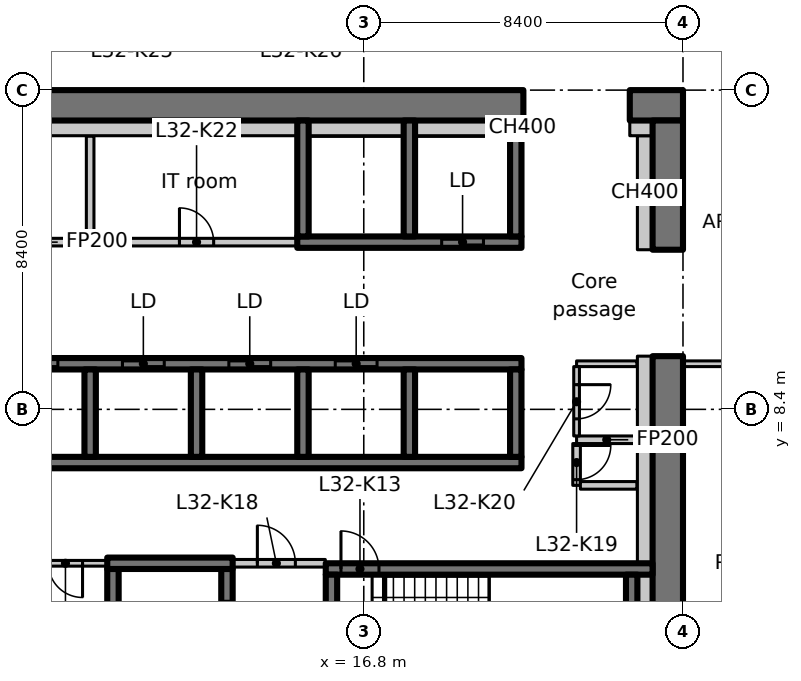
"""IFC4 building model, lengths in metres.
Left out: names, types, materials, properties, quantities, classifications, styles, units other than length and angle.
Written with IfcOpenShell. Run it as: python <this file> out.ifc"""

import sys

from ifc_helpers import new_model, si_unit, direction, frame, frame_2d, origin, place, context, subcontext, project, spatial, rectangle, extrude, element, fill, save


model = new_model("IFC4")
c1 = context("Model", 3, precision=1e-05, world=origin(), true_north=direction((0.0, 1.0)))
c2 = subcontext(c1, "Body", "Model", "MODEL_VIEW")
j1 = project(units=[si_unit("LENGTHUNIT", "METRE"), si_unit("PLANEANGLEUNIT", "RADIAN")], contexts=[c1])
p1 = place(None, origin())
s1 = spatial("IfcSite", under=j1, at=p1, CompositionType="ELEMENT")
p2 = place(p1, origin())
s2 = spatial("IfcBuilding", under=s1, at=p2, CompositionType="ELEMENT")
p3 = place(p2, frame((0.0, 0.0, 131.3)))
s3 = spatial("IfcBuildingStorey", under=s2, at=p3, CompositionType="ELEMENT", Elevation=131.3)
p4 = place(p3, frame((-1.1, 16.4, 0.0), z_axis=(0.0, 0.0, 1.0), x_axis=(1.0, 0.0, 0.0)))
e1 = element("IfcWall", 1, at=p4, inside=s3, PredefinedType="SHEAR", context=c2, shape_type="SweptSolid", body=[
    extrude(rectangle(XDim=22.1, YDim=0.8, at=frame_2d((11.05, 0.0))), origin(), (0.0, 0.0, 1.0), 3.35),
])
p5 = place(p4, frame((3.15, 0.0, 0.0)))
e2 = element("IfcOpeningElement", 2, at=p5, cuts=e1, PredefinedType="OPENING", context=c2, shape_type="SweptSolid", body=[
    extrude(rectangle(XDim=1.1, YDim=2.3, at=frame_2d((0.55, 1.15))), frame((0.0, 0.41, 0.0), z_axis=(0.0, -1.0, 0.0), x_axis=(1.0, 0.0, 0.0)), (0.0, 0.0, 1.0), 0.82),
])
p6 = place(p3, frame((23.8, 16.4, 0.0), z_axis=(0.0, 0.0, 1.0), x_axis=(1.0, 0.0, 0.0)))
e3 = element("IfcWall", 3, at=p6, inside=s3, PredefinedType="SHEAR", context=c2, shape_type="SweptSolid", body=[
    extrude(rectangle(XDim=1.4, YDim=0.8, at=frame_2d((0.7, 0.0))), origin(), (0.0, 0.0, 1.0), 3.35),
])
p7 = place(p3, frame((24.8, 0.8, 0.0), z_axis=(0.0, 0.0, 1.0), x_axis=(0.0, 1.0, 0.0)))
e4 = element("IfcWall", 4, at=p7, inside=s3, PredefinedType="SHEAR", context=c2, shape_type="SweptSolid", body=[
    extrude(rectangle(XDim=9.0, YDim=0.8, at=frame_2d((4.5, 0.0))), origin(), (0.0, 0.0, 1.0), 3.35),
])
p8 = place(p3, frame((24.8, 12.6, 0.0), z_axis=(0.0, 0.0, 1.0), x_axis=(0.0, 1.0, 0.0)))
e5 = element("IfcWall", 5, at=p8, inside=s3, PredefinedType="SHEAR", context=c2, shape_type="SweptSolid", body=[
    extrude(rectangle(XDim=3.4, YDim=0.8, at=frame_2d((1.7, 0.0))), origin(), (0.0, 0.0, 1.0), 3.35),
])
p9 = place(p3, frame((24.2, 12.6, 0.0), z_axis=(0.0, 0.0, 1.0), x_axis=(0.0, 1.0, 0.0)))
e6 = element("IfcWall", 6, at=p9, inside=s3, PredefinedType="PARTITIONING", context=c2, shape_type="SweptSolid", body=[
    extrude(rectangle(XDim=3.0, YDim=0.4, at=frame_2d((1.5, 0.0))), origin(), (0.0, 0.0, 1.0), 3.35),
])
p10 = place(p3, frame((23.8, 15.8, 0.0), z_axis=(0.0, 0.0, 1.0), x_axis=(1.0, 0.0, 0.0)))
e7 = element("IfcWall", 7, at=p10, inside=s3, PredefinedType="PARTITIONING", context=c2, shape_type="SweptSolid", body=[
    extrude(rectangle(XDim=0.6, YDim=0.4, at=frame_2d((0.3, 0.0))), origin(), (0.0, 0.0, 1.0), 3.35),
])
p11 = place(p3, frame((0.8, 7.0, 0.0), z_axis=(0.0, 0.0, 1.0), x_axis=(1.0, 0.0, 0.0)))
e8 = element("IfcWall", 8, at=p11, inside=s3, PredefinedType="SHEAR", context=c2, shape_type="SweptSolid", body=[
    extrude(rectangle(XDim=20.15, YDim=0.3, at=frame_2d((10.075, 0.0))), origin(), (0.0, 0.0, 1.0), 3.35),
])
p12 = place(p3, frame((0.8, 9.6, 0.0), z_axis=(0.0, 0.0, 1.0), x_axis=(1.0, 0.0, 0.0)))
e9 = element("IfcWall", 9, at=p12, inside=s3, PredefinedType="SHEAR", context=c2, shape_type="SweptSolid", body=[
    extrude(rectangle(XDim=20.15, YDim=0.3, at=frame_2d((10.075, 0.0))), origin(), (0.0, 0.0, 1.0), 3.35),
])
p13 = place(p12, frame((1.25, 0.0, 0.0)))
e10 = element("IfcOpeningElement", 10, at=p13, cuts=e9, PredefinedType="OPENING", context=c2, shape_type="SweptSolid", body=[
    extrude(rectangle(XDim=1.1, YDim=2.3, at=frame_2d((0.55, 1.15))), frame((0.0, 0.16, 0.0), z_axis=(0.0, -1.0, 0.0), x_axis=(1.0, 0.0, 0.0)), (0.0, 0.0, 1.0), 0.32),
])
p14 = place(p12, frame((4.05, 0.0, 0.0)))
e11 = element("IfcOpeningElement", 11, at=p14, cuts=e9, PredefinedType="OPENING", context=c2, shape_type="SweptSolid", body=[
    extrude(rectangle(XDim=1.1, YDim=2.3, at=frame_2d((0.55, 1.15))), frame((0.0, 0.16, 0.0), z_axis=(0.0, -1.0, 0.0), x_axis=(1.0, 0.0, 0.0)), (0.0, 0.0, 1.0), 0.32),
])
p15 = place(p12, frame((6.85, 0.0, 0.0)))
e12 = element("IfcOpeningElement", 12, at=p15, cuts=e9, PredefinedType="OPENING", context=c2, shape_type="SweptSolid", body=[
    extrude(rectangle(XDim=1.1, YDim=2.3, at=frame_2d((0.55, 1.15))), frame((0.0, 0.16, 0.0), z_axis=(0.0, -1.0, 0.0), x_axis=(1.0, 0.0, 0.0)), (0.0, 0.0, 1.0), 0.32),
])
p16 = place(p12, frame((9.65, 0.0, 0.0)))
e13 = element("IfcOpeningElement", 13, at=p16, cuts=e9, PredefinedType="OPENING", context=c2, shape_type="SweptSolid", body=[
    extrude(rectangle(XDim=1.1, YDim=2.3, at=frame_2d((0.55, 1.15))), frame((0.0, 0.16, 0.0), z_axis=(0.0, -1.0, 0.0), x_axis=(1.0, 0.0, 0.0)), (0.0, 0.0, 1.0), 0.32),
])
p17 = place(p12, frame((12.45, 0.0, 0.0)))
e14 = element("IfcOpeningElement", 14, at=p17, cuts=e9, PredefinedType="OPENING", context=c2, shape_type="SweptSolid", body=[
    extrude(rectangle(XDim=1.1, YDim=2.3, at=frame_2d((0.55, 1.15))), frame((0.0, 0.16, 0.0), z_axis=(0.0, -1.0, 0.0), x_axis=(1.0, 0.0, 0.0)), (0.0, 0.0, 1.0), 0.32),
])
p18 = place(p12, frame((15.25, 0.0, 0.0)))
e15 = element("IfcOpeningElement", 15, at=p18, cuts=e9, PredefinedType="OPENING", context=c2, shape_type="SweptSolid", body=[
    extrude(rectangle(XDim=1.1, YDim=2.3, at=frame_2d((0.55, 1.15))), frame((0.0, 0.16, 0.0), z_axis=(0.0, -1.0, 0.0), x_axis=(1.0, 0.0, 0.0)), (0.0, 0.0, 1.0), 0.32),
])
for number, where, z_axis, x_axis in (
    (16, (9.6, 7.15, 0.0), (0.0, 0.0, 1.0), (0.0, 1.0, 0.0)),
    (17, (12.4, 7.15, 0.0), (0.0, 0.0, 1.0), (0.0, 1.0, 0.0)),
    (18, (15.2, 7.15, 0.0), (0.0, 0.0, 1.0), (0.0, 1.0, 0.0)),
    (19, (18.0, 7.15, 0.0), (0.0, 0.0, 1.0), (0.0, 1.0, 0.0)),
    (20, (20.8, 7.15, 0.0), (0.0, 0.0, 1.0), (0.0, 1.0, 0.0)),
):
    element("IfcWall", number, at=place(p3, frame(where, z_axis=z_axis, x_axis=x_axis)), inside=s3, PredefinedType="SHEAR", context=c2, shape_type="SweptSolid", body=[
        extrude(rectangle(XDim=2.3, YDim=0.3, at=frame_2d((1.15, 0.0))), origin(), (0.0, 0.0, 1.0), 3.35),
    ])
p19 = place(p3, frame((15.05, 12.8, 0.0), z_axis=(0.0, 0.0, 1.0), x_axis=(1.0, 0.0, 0.0)))
e21 = element("IfcWall", 21, at=p19, inside=s3, PredefinedType="SHEAR", context=c2, shape_type="SweptSolid", body=[
    extrude(rectangle(XDim=5.9, YDim=0.3, at=frame_2d((2.95, 0.0))), origin(), (0.0, 0.0, 1.0), 3.35),
])
p20 = place(p19, frame((3.8, 0.0, 0.0)))
e22 = element("IfcOpeningElement", 22, at=p20, cuts=e21, PredefinedType="OPENING", context=c2, shape_type="SweptSolid", body=[
    extrude(rectangle(XDim=1.1, YDim=2.3, at=frame_2d((0.55, 1.15))), frame((0.0, 0.16, 0.0), z_axis=(0.0, -1.0, 0.0), x_axis=(1.0, 0.0, 0.0)), (0.0, 0.0, 1.0), 0.32),
])
for number, where, z_axis, x_axis in (
    (23, (15.2, 12.95, 0.0), (0.0, 0.0, 1.0), (0.0, 1.0, 0.0)),
    (24, (18.0, 12.95, 0.0), (0.0, 0.0, 1.0), (0.0, 1.0, 0.0)),
    (25, (20.8, 12.95, 0.0), (0.0, 0.0, 1.0), (0.0, 1.0, 0.0)),
):
    element("IfcWall", number, at=place(p3, frame(where, z_axis=z_axis, x_axis=x_axis)), inside=s3, PredefinedType="SHEAR", context=c2, shape_type="SweptSolid", body=[
        extrude(rectangle(XDim=3.05, YDim=0.3, at=frame_2d((1.525, 0.0))), origin(), (0.0, 0.0, 1.0), 3.35),
    ])
p21 = place(p3, frame((10.2, 0.8, 0.0), z_axis=(0.0, 0.0, 1.0), x_axis=(0.0, 1.0, 0.0)))
e26 = element("IfcWall", 26, at=p21, inside=s3, PredefinedType="SHEAR", context=c2, shape_type="SweptSolid", body=[
    extrude(rectangle(XDim=3.4, YDim=0.3, at=frame_2d((1.7, 0.0))), origin(), (0.0, 0.0, 1.0), 3.35),
])
p22 = place(p3, frame((13.2, 0.8, 0.0), z_axis=(0.0, 0.0, 1.0), x_axis=(0.0, 1.0, 0.0)))
e27 = element("IfcWall", 27, at=p22, inside=s3, PredefinedType="SHEAR", context=c2, shape_type="SweptSolid", body=[
    extrude(rectangle(XDim=3.4, YDim=0.3, at=frame_2d((1.7, 0.0))), origin(), (0.0, 0.0, 1.0), 3.35),
])
p23 = place(p22, frame((1.45, 0.0, 0.0)))
e28 = element("IfcOpeningElement", 28, at=p23, cuts=e27, PredefinedType="OPENING", context=c2, shape_type="SweptSolid", body=[
    extrude(rectangle(XDim=1.1, YDim=2.3, at=frame_2d((0.55, 1.15))), frame((0.0, 0.16, 0.0), z_axis=(0.0, -1.0, 0.0), x_axis=(1.0, 0.0, 0.0)), (0.0, 0.0, 1.0), 0.32),
])
p24 = place(p3, frame((10.05, 4.35, 0.0), z_axis=(0.0, 0.0, 1.0), x_axis=(1.0, 0.0, 0.0)))
e29 = element("IfcWall", 29, at=p24, inside=s3, PredefinedType="SHEAR", context=c2, shape_type="SweptSolid", body=[
    extrude(rectangle(XDim=3.3, YDim=0.3, at=frame_2d((1.65, 0.0))), origin(), (0.0, 0.0, 1.0), 3.35),
])
p25 = place(p3, frame((15.8, 4.2, 0.0), z_axis=(0.0, 0.0, 1.0), x_axis=(1.0, 0.0, 0.0)))
e30 = element("IfcWall", 30, at=p25, inside=s3, PredefinedType="SHEAR", context=c2, shape_type="SweptSolid", body=[
    extrude(rectangle(XDim=8.6, YDim=0.3, at=frame_2d((4.3, 0.0))), origin(), (0.0, 0.0, 1.0), 3.35),
])
p26 = place(p25, frame((0.4, 0.0, 0.0)))
e31 = element("IfcOpeningElement", 31, at=p26, cuts=e30, PredefinedType="OPENING", context=c2, shape_type="SweptSolid", body=[
    extrude(rectangle(XDim=1.0, YDim=2.1, at=frame_2d((0.5, 1.05))), frame((0.0, 0.16, 0.0), z_axis=(0.0, -1.0, 0.0), x_axis=(1.0, 0.0, 0.0)), (0.0, 0.0, 1.0), 0.32),
])
p27 = place(p3, frame((15.95, 1.5, 0.0), z_axis=(0.0, 0.0, 1.0), x_axis=(0.0, 1.0, 0.0)))
e32 = element("IfcWall", 32, at=p27, inside=s3, PredefinedType="SHEAR", context=c2, shape_type="SweptSolid", body=[
    extrude(rectangle(XDim=2.55, YDim=0.3, at=frame_2d((1.275, 0.0))), origin(), (0.0, 0.0, 1.0), 3.35),
])
p28 = place(p27, frame((0.8, 0.0, 0.0)))
e33 = element("IfcOpeningElement", 33, at=p28, cuts=e32, PredefinedType="OPENING", context=c2, shape_type="SweptSolid", body=[
    extrude(rectangle(XDim=1.0, YDim=2.1, at=frame_2d((0.5, 1.05))), frame((0.0, 0.16, 0.0), z_axis=(0.0, -1.0, 0.0), x_axis=(1.0, 0.0, 0.0)), (0.0, 0.0, 1.0), 0.32),
])
p29 = place(p3, frame((23.85, 1.5, 0.0), z_axis=(0.0, 0.0, 1.0), x_axis=(0.0, 1.0, 0.0)))
e34 = element("IfcWall", 34, at=p29, inside=s3, PredefinedType="SHEAR", context=c2, shape_type="SweptSolid", body=[
    extrude(rectangle(XDim=2.55, YDim=0.3, at=frame_2d((1.275, 0.0))), origin(), (0.0, 0.0, 1.0), 3.35),
])
p30 = place(p3, frame((13.362, 4.35, 0.0), z_axis=(0.0, 0.0, 1.0), x_axis=(1.0, 0.0, 0.0)))
e35 = element("IfcWall", 35, at=p30, inside=s3, PredefinedType="PARTITIONING", context=c2, shape_type="SweptSolid", body=[
    extrude(rectangle(XDim=2.426, YDim=0.2, at=frame_2d((1.213, 0.0))), origin(), (0.0, 0.0, 1.0), 3.35),
])
p31 = place(p30, frame((0.638, 0.0, 0.0)))
e36 = element("IfcOpeningElement", 36, at=p31, cuts=e35, PredefinedType="OPENING", context=c2, shape_type="SweptSolid", body=[
    extrude(rectangle(XDim=1.0, YDim=2.1, at=frame_2d((0.5, 1.05))), frame((0.0, 0.11, 0.0), z_axis=(0.0, -1.0, 0.0), x_axis=(1.0, 0.0, 0.0)), (0.0, 0.0, 1.0), 0.22),
])
p32 = place(p3, frame((4.162, 12.8, 0.0), z_axis=(0.0, 0.0, 1.0), x_axis=(1.0, 0.0, 0.0)))
e37 = element("IfcWall", 37, at=p32, inside=s3, PredefinedType="PARTITIONING", context=c2, shape_type="SweptSolid", body=[
    extrude(rectangle(XDim=5.438, YDim=0.2, at=frame_2d((2.719, 0.0))), origin(), (0.0, 0.0, 1.0), 3.35),
])
p33 = place(p32, frame((2.188, 0.0, 0.0)))
e38 = element("IfcOpeningElement", 38, at=p33, cuts=e37, PredefinedType="OPENING", context=c2, shape_type="SweptSolid", body=[
    extrude(rectangle(XDim=0.9, YDim=2.1, at=frame_2d((0.45, 1.05))), frame((0.0, 0.11, 0.0), z_axis=(0.0, -1.0, 0.0), x_axis=(1.0, 0.0, 0.0)), (0.0, 0.0, 1.0), 0.22),
])
p34 = place(p3, frame((9.6, 12.8, 0.0), z_axis=(0.0, 0.0, 1.0), x_axis=(1.0, 0.0, 0.0)))
e39 = element("IfcWall", 39, at=p34, inside=s3, PredefinedType="PARTITIONING", context=c2, shape_type="SweptSolid", body=[
    extrude(rectangle(XDim=5.438, YDim=0.2, at=frame_2d((2.719, 0.0))), origin(), (0.0, 0.0, 1.0), 3.35),
])
p35 = place(p34, frame((2.35, 0.0, 0.0)))
e40 = element("IfcOpeningElement", 40, at=p35, cuts=e39, PredefinedType="OPENING", context=c2, shape_type="SweptSolid", body=[
    extrude(rectangle(XDim=0.9, YDim=2.1, at=frame_2d((0.45, 1.05))), frame((0.0, 0.11, 0.0), z_axis=(0.0, -1.0, 0.0), x_axis=(1.0, 0.0, 0.0)), (0.0, 0.0, 1.0), 0.22),
])
p36 = place(p3, frame((9.6, 15.588, 0.0), z_axis=(0.0, 0.0, 1.0), x_axis=(0.0, -1.0, 0.0)))
e41 = element("IfcWall", 41, at=p36, inside=s3, PredefinedType="PARTITIONING", context=c2, shape_type="SweptSolid", body=[
    extrude(rectangle(XDim=2.688, YDim=0.2, at=frame_2d((1.344, 0.0))), origin(), (0.0, 0.0, 1.0), 3.35),
])
p37 = place(p3, frame((23.988, 7.6, 0.0), z_axis=(0.0, 0.0, 1.0), x_axis=(-1.0, 0.0, 0.0)))
e42 = element("IfcWall", 42, at=p37, inside=s3, PredefinedType="PARTITIONING", context=c2, shape_type="SweptSolid", body=[
    extrude(rectangle(XDim=1.588, YDim=0.2, at=frame_2d((0.794, 0.0))), origin(), (0.0, 0.0, 1.0), 3.35),
])
p38 = place(p3, frame((22.4, 7.5, 0.0), z_axis=(0.0, 0.0, 1.0), x_axis=(0.0, -1.0, 0.0)))
e43 = element("IfcWall", 43, at=p38, inside=s3, PredefinedType="PARTITIONING", context=c2, shape_type="SweptSolid", body=[
    extrude(rectangle(XDim=1.1, YDim=0.2, at=frame_2d((0.55, 0.0))), origin(), (0.0, 0.0, 1.0), 3.35),
])
p39 = place(p38, frame((0.05, 0.0, 0.0)))
e44 = element("IfcOpeningElement", 44, at=p39, cuts=e43, PredefinedType="OPENING", context=c2, shape_type="SweptSolid", body=[
    extrude(rectangle(XDim=0.9, YDim=2.1, at=frame_2d((0.45, 1.05))), frame((0.0, 0.11, 0.0), z_axis=(0.0, -1.0, 0.0), x_axis=(1.0, 0.0, 0.0)), (0.0, 0.0, 1.0), 0.22),
])
p40 = place(p3, frame((22.5, 6.4, 0.0), z_axis=(0.0, 0.0, 1.0), x_axis=(1.0, 0.0, 0.0)))
e45 = element("IfcWall", 45, at=p40, inside=s3, PredefinedType="PARTITIONING", context=c2, shape_type="SweptSolid", body=[
    extrude(rectangle(XDim=1.488, YDim=0.2, at=frame_2d((0.744, 0.0))), origin(), (0.0, 0.0, 1.0), 3.35),
])
p41 = place(p3, frame((10.038, 4.35, 0.0), z_axis=(0.0, 0.0, 1.0), x_axis=(-1.0, 0.0, 0.0)))
e46 = element("IfcWall", 46, at=p41, inside=s3, PredefinedType="PARTITIONING", context=c2, shape_type="SweptSolid", body=[
    extrude(rectangle(XDim=2.263, YDim=0.15, at=frame_2d((1.132, 0.0))), origin(), (0.0, 0.0, 1.0), 3.35),
])
p42 = place(p41, frame((0.638, 0.0, 0.0)))
e47 = element("IfcOpeningElement", 47, at=p42, cuts=e46, PredefinedType="OPENING", context=c2, shape_type="SweptSolid", body=[
    extrude(rectangle(XDim=0.9, YDim=2.1, at=frame_2d((0.45, 1.05))), frame((0.0, 0.085, 0.0), z_axis=(0.0, -1.0, 0.0), x_axis=(1.0, 0.0, 0.0)), (0.0, 0.0, 1.0), 0.17),
])
p43 = place(p3, frame((23.988, 9.6, 0.0), z_axis=(0.0, 0.0, 1.0), x_axis=(-1.0, 0.0, 0.0)))
e48 = element("IfcWall", 48, at=p43, inside=s3, PredefinedType="PARTITIONING", context=c2, shape_type="SweptSolid", body=[
    extrude(rectangle(XDim=1.588, YDim=0.15, at=frame_2d((0.794, 0.0))), origin(), (0.0, 0.0, 1.0), 3.35),
])
p44 = place(p3, frame((22.4, 9.525, 0.0), z_axis=(0.0, 0.0, 1.0), x_axis=(0.0, -1.0, 0.0)))
e49 = element("IfcWall", 49, at=p44, inside=s3, PredefinedType="PARTITIONING", context=c2, shape_type="SweptSolid", body=[
    extrude(rectangle(XDim=1.825, YDim=0.15, at=frame_2d((0.913, 0.0))), origin(), (0.0, 0.0, 1.0), 3.35),
])
p45 = place(p44, frame((0.475, 0.0, 0.0)))
e50 = element("IfcOpeningElement", 50, at=p45, cuts=e49, PredefinedType="OPENING", context=c2, shape_type="SweptSolid", body=[
    extrude(rectangle(XDim=0.9, YDim=2.1, at=frame_2d((0.45, 1.05))), frame((0.0, 0.085, 0.0), z_axis=(0.0, -1.0, 0.0), x_axis=(1.0, 0.0, 0.0)), (0.0, 0.0, 1.0), 0.17),
])
p46 = place(p3, frame((4.15, 15.8, 0.0), z_axis=(0.0, 0.0, 1.0), x_axis=(1.0, 0.0, 0.0)))
e51 = element("IfcWall", 51, at=p46, inside=s3, PredefinedType="PARTITIONING", context=c2, shape_type="SweptSolid", body=[
    extrude(rectangle(XDim=10.9, YDim=0.4, at=frame_2d((5.45, 0.0))), origin(), (0.0, 0.0, 1.0), 3.35),
])
for number, where, z_axis, x_axis in (
    (52, (15.35, 15.8, 0.0), (0.0, 0.0, 1.0), (1.0, 0.0, 0.0)),
    (53, (18.15, 15.8, 0.0), (0.0, 0.0, 1.0), (1.0, 0.0, 0.0)),
):
    element("IfcWall", number, at=place(p3, frame(where, z_axis=z_axis, x_axis=x_axis)), inside=s3, PredefinedType="PARTITIONING", context=c2, shape_type="SweptSolid", body=[
        extrude(rectangle(XDim=2.5, YDim=0.4, at=frame_2d((1.25, 0.0))), origin(), (0.0, 0.0, 1.0), 3.35),
    ])
p47 = place(p3, frame((20.95, 15.8, 0.0), z_axis=(0.0, 0.0, 1.0), x_axis=(1.0, 0.0, 0.0)))
e54 = element("IfcWall", 54, at=p47, inside=s3, PredefinedType="PARTITIONING", context=c2, shape_type="SweptSolid", body=[
    extrude(rectangle(XDim=0.05, YDim=0.4, at=frame_2d((0.025, 0.0))), origin(), (0.0, 0.0, 1.0), 3.35),
])
p48 = place(p3, frame((24.2, 1.5, 0.0), z_axis=(0.0, 0.0, 1.0), x_axis=(0.0, 1.0, 0.0)))
e55 = element("IfcWall", 55, at=p48, inside=s3, PredefinedType="PARTITIONING", context=c2, shape_type="SweptSolid", body=[
    extrude(rectangle(XDim=2.55, YDim=0.4, at=frame_2d((1.275, 0.0))), origin(), (0.0, 0.0, 1.0), 3.35),
])
p49 = place(p3, frame((24.2, 4.35, 0.0), z_axis=(0.0, 0.0, 1.0), x_axis=(0.0, 1.0, 0.0)))
e56 = element("IfcWall", 56, at=p49, inside=s3, PredefinedType="PARTITIONING", context=c2, shape_type="SweptSolid", body=[
    extrude(rectangle(XDim=5.45, YDim=0.4, at=frame_2d((2.725, 0.0))), origin(), (0.0, 0.0, 1.0), 3.35),
])
p50 = place(p3, frame((29.4, 9.6, 0.0), z_axis=(0.0, 0.0, 1.0), x_axis=(-1.0, 0.0, 0.0)))
e57 = element("IfcWall", 57, at=p50, inside=s3, PredefinedType="PARTITIONING", context=c2, shape_type="SweptSolid", body=[
    extrude(rectangle(XDim=4.2, YDim=0.15, at=frame_2d((2.1, 0.0))), origin(), (0.0, 0.0, 1.0), 3.33),
])
p51 = place(p50, frame((1.5, 0.0, 0.0)))
e58 = element("IfcOpeningElement", 58, at=p51, cuts=e57, PredefinedType="OPENING", context=c2, shape_type="SweptSolid", body=[
    extrude(rectangle(XDim=1.1, YDim=2.1, at=frame_2d((0.55, 1.05))), frame((0.0, 0.085, 0.0), z_axis=(0.0, -1.0, 0.0), x_axis=(1.0, 0.0, 0.0)), (0.0, 0.0, 1.0), 0.17),
])
p52 = place(p15, origin())
e59 = element("IfcDoor", 59, at=p52, inside=s3, OperationType="SLIDING_TO_LEFT", PredefinedType="DOOR", context=c2, shape_type="SweptSolid", body=[
    extrude(rectangle(XDim=1.1, YDim=2.3, at=frame_2d((0.55, 1.15))), frame((0.0, 0.025, 0.0), z_axis=(0.0, -1.0, 0.0), x_axis=(1.0, 0.0, 0.0)), (0.0, 0.0, 1.0), 0.05),
])
fill(e12, e59)
p53 = place(p16, origin())
e60 = element("IfcDoor", 60, at=p53, inside=s3, OperationType="SLIDING_TO_LEFT", PredefinedType="DOOR", context=c2, shape_type="SweptSolid", body=[
    extrude(rectangle(XDim=1.1, YDim=2.3, at=frame_2d((0.55, 1.15))), frame((0.0, 0.025, 0.0), z_axis=(0.0, -1.0, 0.0), x_axis=(1.0, 0.0, 0.0)), (0.0, 0.0, 1.0), 0.05),
])
fill(e13, e60)
p54 = place(p17, origin())
e61 = element("IfcDoor", 61, at=p54, inside=s3, OperationType="SLIDING_TO_LEFT", PredefinedType="DOOR", context=c2, shape_type="SweptSolid", body=[
    extrude(rectangle(XDim=1.1, YDim=2.3, at=frame_2d((0.55, 1.15))), frame((0.0, 0.025, 0.0), z_axis=(0.0, -1.0, 0.0), x_axis=(1.0, 0.0, 0.0)), (0.0, 0.0, 1.0), 0.05),
])
fill(e14, e61)
p55 = place(p18, origin())
e62 = element("IfcDoor", 62, at=p55, inside=s3, OperationType="SLIDING_TO_LEFT", PredefinedType="DOOR", context=c2, shape_type="SweptSolid", body=[
    extrude(rectangle(XDim=1.1, YDim=2.3, at=frame_2d((0.55, 1.15))), frame((0.0, 0.025, 0.0), z_axis=(0.0, -1.0, 0.0), x_axis=(1.0, 0.0, 0.0)), (0.0, 0.0, 1.0), 0.05),
])
fill(e15, e62)
p56 = place(p20, origin())
e63 = element("IfcDoor", 63, at=p56, inside=s3, OperationType="SLIDING_TO_LEFT", PredefinedType="DOOR", context=c2, shape_type="SweptSolid", body=[
    extrude(rectangle(XDim=1.1, YDim=2.3, at=frame_2d((0.55, 1.15))), frame((0.0, 0.025, 0.0), z_axis=(0.0, -1.0, 0.0), x_axis=(1.0, 0.0, 0.0)), (0.0, 0.0, 1.0), 0.05),
])
fill(e22, e63)
p57 = place(p26, origin())
e64 = element("IfcDoor", 64, at=p57, inside=s3, OperationType="SINGLE_SWING_RIGHT", PredefinedType="DOOR", context=c2, shape_type="SweptSolid", body=[
    extrude(rectangle(XDim=1.0, YDim=2.1, at=frame_2d((0.5, 1.05))), frame((0.0, 0.025, 0.0), z_axis=(0.0, -1.0, 0.0), x_axis=(1.0, 0.0, 0.0)), (0.0, 0.0, 1.0), 0.05),
])
fill(e31, e64)
p58 = place(p42, origin())
e65 = element("IfcDoor", 65, at=p58, inside=s3, OperationType="SINGLE_SWING_RIGHT", PredefinedType="DOOR", context=c2, shape_type="SweptSolid", body=[
    extrude(rectangle(XDim=0.9, YDim=2.1, at=frame_2d((0.45, 1.05))), frame((0.0, 0.025, 0.0), z_axis=(0.0, -1.0, 0.0), x_axis=(1.0, 0.0, 0.0)), (0.0, 0.0, 1.0), 0.05),
])
fill(e47, e65)
p59 = place(p31, origin())
e66 = element("IfcDoor", 66, at=p59, inside=s3, OperationType="SINGLE_SWING_LEFT", PredefinedType="DOOR", context=c2, shape_type="SweptSolid", body=[
    extrude(rectangle(XDim=1.0, YDim=2.1, at=frame_2d((0.5, 1.05))), frame((0.0, 0.025, 0.0), z_axis=(0.0, -1.0, 0.0), x_axis=(1.0, 0.0, 0.0)), (0.0, 0.0, 1.0), 0.05),
])
fill(e36, e66)
p60 = place(p39, origin())
e67 = element("IfcDoor", 67, at=p60, inside=s3, OperationType="SINGLE_SWING_RIGHT", PredefinedType="DOOR", context=c2, shape_type="SweptSolid", body=[
    extrude(rectangle(XDim=0.9, YDim=2.1, at=frame_2d((0.45, 1.05))), frame((0.0, 0.025, 0.0), z_axis=(0.0, -1.0, 0.0), x_axis=(1.0, 0.0, 0.0)), (0.0, 0.0, 1.0), 0.05),
])
fill(e44, e67)
p61 = place(p45, origin())
e68 = element("IfcDoor", 68, at=p61, inside=s3, OperationType="SINGLE_SWING_LEFT", PredefinedType="DOOR", context=c2, shape_type="SweptSolid", body=[
    extrude(rectangle(XDim=0.9, YDim=2.1, at=frame_2d((0.45, 1.05))), frame((0.0, 0.025, 0.0), z_axis=(0.0, -1.0, 0.0), x_axis=(1.0, 0.0, 0.0)), (0.0, 0.0, 1.0), 0.05),
])
fill(e50, e68)
p62 = place(p35, origin())
e69 = element("IfcDoor", 69, at=p62, inside=s3, OperationType="SINGLE_SWING_LEFT", PredefinedType="DOOR", context=c2, shape_type="SweptSolid", body=[
    extrude(rectangle(XDim=0.9, YDim=2.1, at=frame_2d((0.45, 1.05))), frame((0.0, 0.025, 0.0), z_axis=(0.0, -1.0, 0.0), x_axis=(1.0, 0.0, 0.0)), (0.0, 0.0, 1.0), 0.05),
])
fill(e40, e69)
save(model, sys.argv[1])
